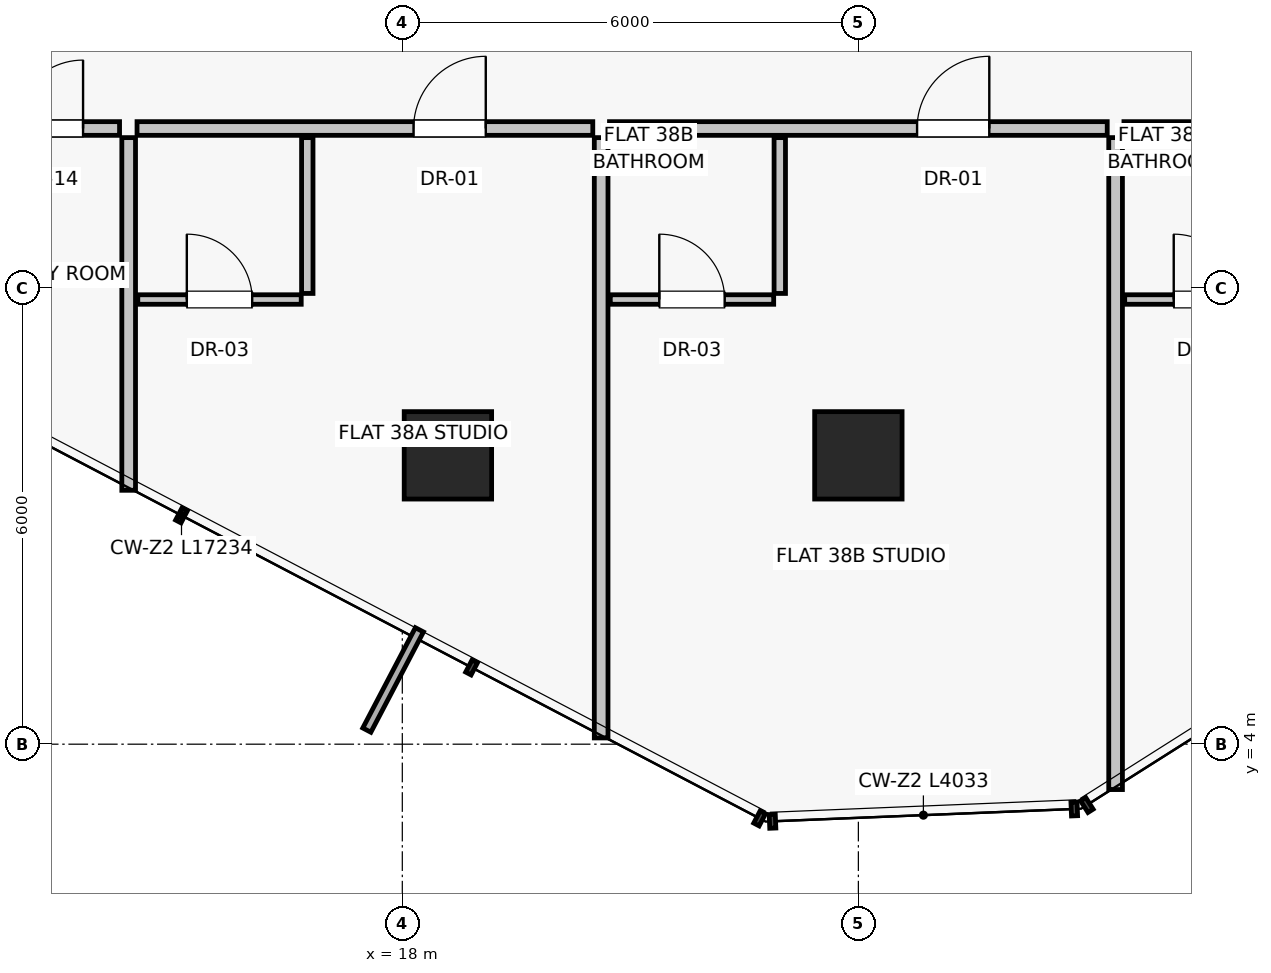
"""IFC4 building model, lengths in metres.
Left out: names, types, materials, properties, quantities, classifications, styles, units other than length and angle.
Written with IfcOpenShell. Run it as: python <this file> out.ifc"""

import sys

from ifc_helpers import new_model, si_unit, direction, frame, frame_2d, origin, origin_2d, place, context, subcontext, project, spatial, rectangle, extrude, source, transform, mapped, element, fill, save


model = new_model("IFC4")
c1 = context("Model", 3, precision=1e-05, world=origin(), true_north=direction((0.0, 1.0)))
c2 = subcontext(c1, "Body", "Model", "MODEL_VIEW")
j1 = project(units=[si_unit("LENGTHUNIT", "METRE"), si_unit("PLANEANGLEUNIT", "RADIAN")], contexts=[c1])
p1 = place(None, origin())
s1 = spatial("IfcSite", under=j1, at=p1, CompositionType="ELEMENT")
p2 = place(p1, origin())
s2 = spatial("IfcBuilding", under=s1, at=p2, CompositionType="ELEMENT")
p3 = place(p2, frame((0.0, 0.0, 136.0)))
s3 = spatial("IfcBuildingStorey", under=s2, at=p3, CompositionType="ELEMENT", Elevation=136.0)
for number, where, z_axis, x_axis in (
    (1, (18.6, 7.8, 0.0), (0.0, 0.0, 1.0), (1.0, 0.0, 0.0)),
    (2, (24.0, 7.8, 0.0), (0.0, 0.0, 1.0), (1.0, 0.0, 0.0)),
):
    element("IfcColumn", number, at=place(p3, frame(where, z_axis=z_axis, x_axis=x_axis)), inside=s3, PredefinedType="COLUMN", context=c2, shape_type="SweptSolid", body=[
        extrude(rectangle(XDim=1.15, YDim=1.15, at=origin_2d()), origin(), (0.0, 0.0, 1.0), 3.25),
    ])
p4 = place(p3, frame((14.4, 11.98, 0.0), z_axis=(0.0, 0.0, 1.0), x_axis=(0.0, -1.0, 0.0)))
e3 = element("IfcWall", 3, at=p4, inside=s3, PredefinedType="PARTITIONING", context=c2, shape_type="SweptSolid", body=[
    extrude(rectangle(XDim=4.64, YDim=0.18, at=frame_2d((2.32, 0.0))), origin(), (0.0, 0.0, 1.0), 3.0),
])
p5 = place(p3, frame((14.51, 12.1, 0.0), z_axis=(0.0, 0.0, 1.0), x_axis=(1.0, 0.0, 0.0)))
e4 = element("IfcWall", 4, at=p5, inside=s3, PredefinedType="PARTITIONING", context=c2, shape_type="SweptSolid", body=[
    extrude(rectangle(XDim=5.996, YDim=0.18, at=frame_2d((2.998, 0.0))), origin(), (0.0, 0.0, 1.0), 2.58),
])
p6 = place(p5, frame((3.638, 0.0, 0.0)))
e5 = element("IfcOpeningElement", 5, at=p6, cuts=e4, PredefinedType="OPENING", context=c2, shape_type="SweptSolid", body=[
    extrude(rectangle(XDim=0.95, YDim=2.02, at=frame_2d((0.475, 1.01))), frame((0.0, 0.1, 0.0), z_axis=(0.0, -1.0, 0.0), x_axis=(1.0, 0.0, 0.0)), (0.0, 0.0, 1.0), 0.2),
])
p7 = place(p3, frame((16.75, 11.98, 0.0), z_axis=(0.0, 0.0, 1.0), x_axis=(0.0, -1.0, 0.0)))
e6 = element("IfcWall", 6, at=p7, inside=s3, PredefinedType="PARTITIONING", context=c2, shape_type="SweptSolid", body=[
    extrude(rectangle(XDim=2.05, YDim=0.15, at=frame_2d((1.025, 0.0))), origin(), (0.0, 0.0, 1.0), 3.0),
])
p8 = place(p3, frame((14.52, 9.85, 0.0), z_axis=(0.0, 0.0, 1.0), x_axis=(1.0, 0.0, 0.0)))
e7 = element("IfcWall", 7, at=p8, inside=s3, PredefinedType="PARTITIONING", context=c2, shape_type="SweptSolid", body=[
    extrude(rectangle(XDim=2.15, YDim=0.125, at=frame_2d((1.075, 0.0))), origin(), (0.0, 0.0, 1.0), 3.0),
])
p9 = place(p8, frame((0.645, 0.0, 0.0)))
e8 = element("IfcOpeningElement", 8, at=p9, cuts=e7, PredefinedType="OPENING", context=c2, shape_type="SweptSolid", body=[
    extrude(rectangle(XDim=0.86, YDim=2.01, at=frame_2d((0.43, 1.005))), frame((0.0, 0.073, 0.0), z_axis=(0.0, -1.0, 0.0), x_axis=(1.0, 0.0, 0.0)), (0.0, 0.0, 1.0), 0.145),
])
p10 = place(p3, frame((20.616, 11.98, 0.0), z_axis=(0.0, 0.0, 1.0), x_axis=(0.0, -1.0, 0.0)))
e9 = element("IfcWall", 9, at=p10, inside=s3, PredefinedType="PARTITIONING", context=c2, shape_type="SweptSolid", body=[
    extrude(rectangle(XDim=7.898, YDim=0.18, at=frame_2d((3.949, 0.0))), origin(), (0.0, 0.0, 1.0), 3.0),
])
p11 = place(p3, frame((20.726, 12.1, 0.0), z_axis=(0.0, 0.0, 1.0), x_axis=(1.0, 0.0, 0.0)))
e10 = element("IfcWall", 10, at=p11, inside=s3, PredefinedType="PARTITIONING", context=c2, shape_type="SweptSolid", body=[
    extrude(rectangle(XDim=6.548, YDim=0.18, at=frame_2d((3.274, 0.0))), origin(), (0.0, 0.0, 1.0), 2.58),
])
p12 = place(p11, frame((4.046, 0.0, 0.0)))
e11 = element("IfcOpeningElement", 11, at=p12, cuts=e10, PredefinedType="OPENING", context=c2, shape_type="SweptSolid", body=[
    extrude(rectangle(XDim=0.95, YDim=2.02, at=frame_2d((0.475, 1.01))), frame((0.0, 0.1, 0.0), z_axis=(0.0, -1.0, 0.0), x_axis=(1.0, 0.0, 0.0)), (0.0, 0.0, 1.0), 0.2),
])
p13 = place(p3, frame((22.966, 11.98, 0.0), z_axis=(0.0, 0.0, 1.0), x_axis=(0.0, -1.0, 0.0)))
e12 = element("IfcWall", 12, at=p13, inside=s3, PredefinedType="PARTITIONING", context=c2, shape_type="SweptSolid", body=[
    extrude(rectangle(XDim=2.05, YDim=0.15, at=frame_2d((1.025, 0.0))), origin(), (0.0, 0.0, 1.0), 3.0),
])
p14 = place(p3, frame((20.736, 9.85, 0.0), z_axis=(0.0, 0.0, 1.0), x_axis=(1.0, 0.0, 0.0)))
e13 = element("IfcWall", 13, at=p14, inside=s3, PredefinedType="PARTITIONING", context=c2, shape_type="SweptSolid", body=[
    extrude(rectangle(XDim=2.15, YDim=0.125, at=frame_2d((1.075, 0.0))), origin(), (0.0, 0.0, 1.0), 3.0),
])
p15 = place(p14, frame((0.645, 0.0, 0.0)))
e14 = element("IfcOpeningElement", 14, at=p15, cuts=e13, PredefinedType="OPENING", context=c2, shape_type="SweptSolid", body=[
    extrude(rectangle(XDim=0.86, YDim=2.01, at=frame_2d((0.43, 1.005))), frame((0.0, 0.073, 0.0), z_axis=(0.0, -1.0, 0.0), x_axis=(1.0, 0.0, 0.0)), (0.0, 0.0, 1.0), 0.145),
])
p16 = place(p3, frame((27.384, 11.98, 0.0), z_axis=(0.0, 0.0, 1.0), x_axis=(0.0, -1.0, 0.0)))
e15 = element("IfcWall", 15, at=p16, inside=s3, PredefinedType="PARTITIONING", context=c2, shape_type="SweptSolid", body=[
    extrude(rectangle(XDim=8.577, YDim=0.18, at=frame_2d((4.289, 0.0))), origin(), (0.0, 0.0, 1.0), 3.0),
])
p17 = place(p3, frame((27.494, 12.1, 0.0), z_axis=(0.0, 0.0, 1.0), x_axis=(1.0, 0.0, 0.0)))
e16 = element("IfcWall", 16, at=p17, inside=s3, PredefinedType="PARTITIONING", context=c2, shape_type="SweptSolid", body=[
    extrude(rectangle(XDim=5.996, YDim=0.18, at=frame_2d((2.998, 0.0))), origin(), (0.0, 0.0, 1.0), 2.58),
])
p18 = place(p17, frame((3.638, 0.0, 0.0)))
e17 = element("IfcOpeningElement", 17, at=p18, cuts=e16, PredefinedType="OPENING", context=c2, shape_type="SweptSolid", body=[
    extrude(rectangle(XDim=0.95, YDim=2.02, at=frame_2d((0.475, 1.01))), frame((0.0, 0.1, 0.0), z_axis=(0.0, -1.0, 0.0), x_axis=(1.0, 0.0, 0.0)), (0.0, 0.0, 1.0), 0.2),
])
p19 = place(p3, frame((27.504, 9.85, 0.0), z_axis=(0.0, 0.0, 1.0), x_axis=(1.0, 0.0, 0.0)))
e18 = element("IfcWall", 18, at=p19, inside=s3, PredefinedType="PARTITIONING", context=c2, shape_type="SweptSolid", body=[
    extrude(rectangle(XDim=2.15, YDim=0.125, at=frame_2d((1.075, 0.0))), origin(), (0.0, 0.0, 1.0), 3.0),
])
p20 = place(p19, frame((0.645, 0.0, 0.0)))
e19 = element("IfcOpeningElement", 19, at=p20, cuts=e18, PredefinedType="OPENING", context=c2, shape_type="SweptSolid", body=[
    extrude(rectangle(XDim=0.86, YDim=2.01, at=frame_2d((0.43, 1.005))), frame((0.0, 0.073, 0.0), z_axis=(0.0, -1.0, 0.0), x_axis=(1.0, 0.0, 0.0)), (0.0, 0.0, 1.0), 0.145),
])
p21 = place(p3, frame((12.42, 12.1, 0.0), z_axis=(0.0, 0.0, 1.0), x_axis=(1.0, 0.0, 0.0)))
e20 = element("IfcWall", 20, at=p21, inside=s3, PredefinedType="PARTITIONING", context=c2, shape_type="SweptSolid", body=[
    extrude(rectangle(XDim=1.86, YDim=0.18, at=frame_2d((0.93, 0.0))), origin(), (0.0, 0.0, 1.0), 3.0),
])
p22 = place(p21, frame((0.48, 0.0, 0.0)))
e21 = element("IfcOpeningElement", 21, at=p22, cuts=e20, PredefinedType="OPENING", context=c2, shape_type="SweptSolid", body=[
    extrude(rectangle(XDim=0.9, YDim=2.01, at=frame_2d((0.45, 1.005))), frame((0.0, 0.1, 0.0), z_axis=(0.0, -1.0, 0.0), x_axis=(1.0, 0.0, 0.0)), (0.0, 0.0, 1.0), 0.2),
])
m1 = source(origin(), c2, "Body", "SweptSolid", [
    extrude(rectangle(XDim=0.95, YDim=2.02, at=frame_2d((0.475, 1.01))), frame((0.0, 0.025, 0.0), z_axis=(0.0, -1.0, 0.0), x_axis=(1.0, 0.0, 0.0)), (0.0, 0.0, 1.0), 0.05),
])
p23 = place(p6, origin())
e22 = element("IfcDoor", 22, at=p23, inside=s3, OperationType="SINGLE_SWING_RIGHT", PredefinedType="DOOR", context=c2, shape_type="MappedRepresentation", body=[
    mapped(m1, transform((0.0, 0.0, 0.0), scale=1.0)),
])
fill(e5, e22)
m2 = source(origin(), c2, "Body", "SweptSolid", [
    extrude(rectangle(XDim=0.86, YDim=2.01, at=frame_2d((0.43, 1.005))), frame((0.0, 0.025, 0.0), z_axis=(0.0, -1.0, 0.0), x_axis=(1.0, 0.0, 0.0)), (0.0, 0.0, 1.0), 0.05),
])
p24 = place(p9, origin())
e23 = element("IfcDoor", 23, at=p24, inside=s3, OperationType="SINGLE_SWING_LEFT", PredefinedType="DOOR", context=c2, shape_type="MappedRepresentation", body=[
    mapped(m2, transform((0.0, 0.0, 0.0), scale=1.0)),
])
fill(e8, e23)
p25 = place(p12, origin())
e24 = element("IfcDoor", 24, at=p25, inside=s3, OperationType="SINGLE_SWING_RIGHT", PredefinedType="DOOR", context=c2, shape_type="MappedRepresentation", body=[
    mapped(m1, transform((0.0, 0.0, 0.0), scale=1.0)),
])
fill(e11, e24)
p26 = place(p15, origin())
e25 = element("IfcDoor", 25, at=p26, inside=s3, OperationType="SINGLE_SWING_LEFT", PredefinedType="DOOR", context=c2, shape_type="MappedRepresentation", body=[
    mapped(m2, transform((0.0, 0.0, 0.0), scale=1.0)),
])
fill(e14, e25)
p27 = place(p20, origin())
e26 = element("IfcDoor", 26, at=p27, inside=s3, OperationType="SINGLE_SWING_LEFT", PredefinedType="DOOR", context=c2, shape_type="MappedRepresentation", body=[
    mapped(m2, transform((0.0, 0.0, 0.0), scale=1.0)),
])
fill(e19, e26)
m3 = source(origin(), c2, "Body", "SweptSolid", [
    extrude(rectangle(XDim=0.9, YDim=2.01, at=frame_2d((0.45, 1.005))), frame((0.0, 0.025, 0.0), z_axis=(0.0, -1.0, 0.0), x_axis=(1.0, 0.0, 0.0)), (0.0, 0.0, 1.0), 0.05),
])
p28 = place(p22, origin())
e27 = element("IfcDoor", 27, at=p28, inside=s3, OperationType="SINGLE_SWING_RIGHT", PredefinedType="DOOR", context=c2, shape_type="MappedRepresentation", body=[
    mapped(m3, transform((0.0, 0.0, 0.0), scale=1.0)),
])
fill(e21, e27)
save(model, sys.argv[1])
